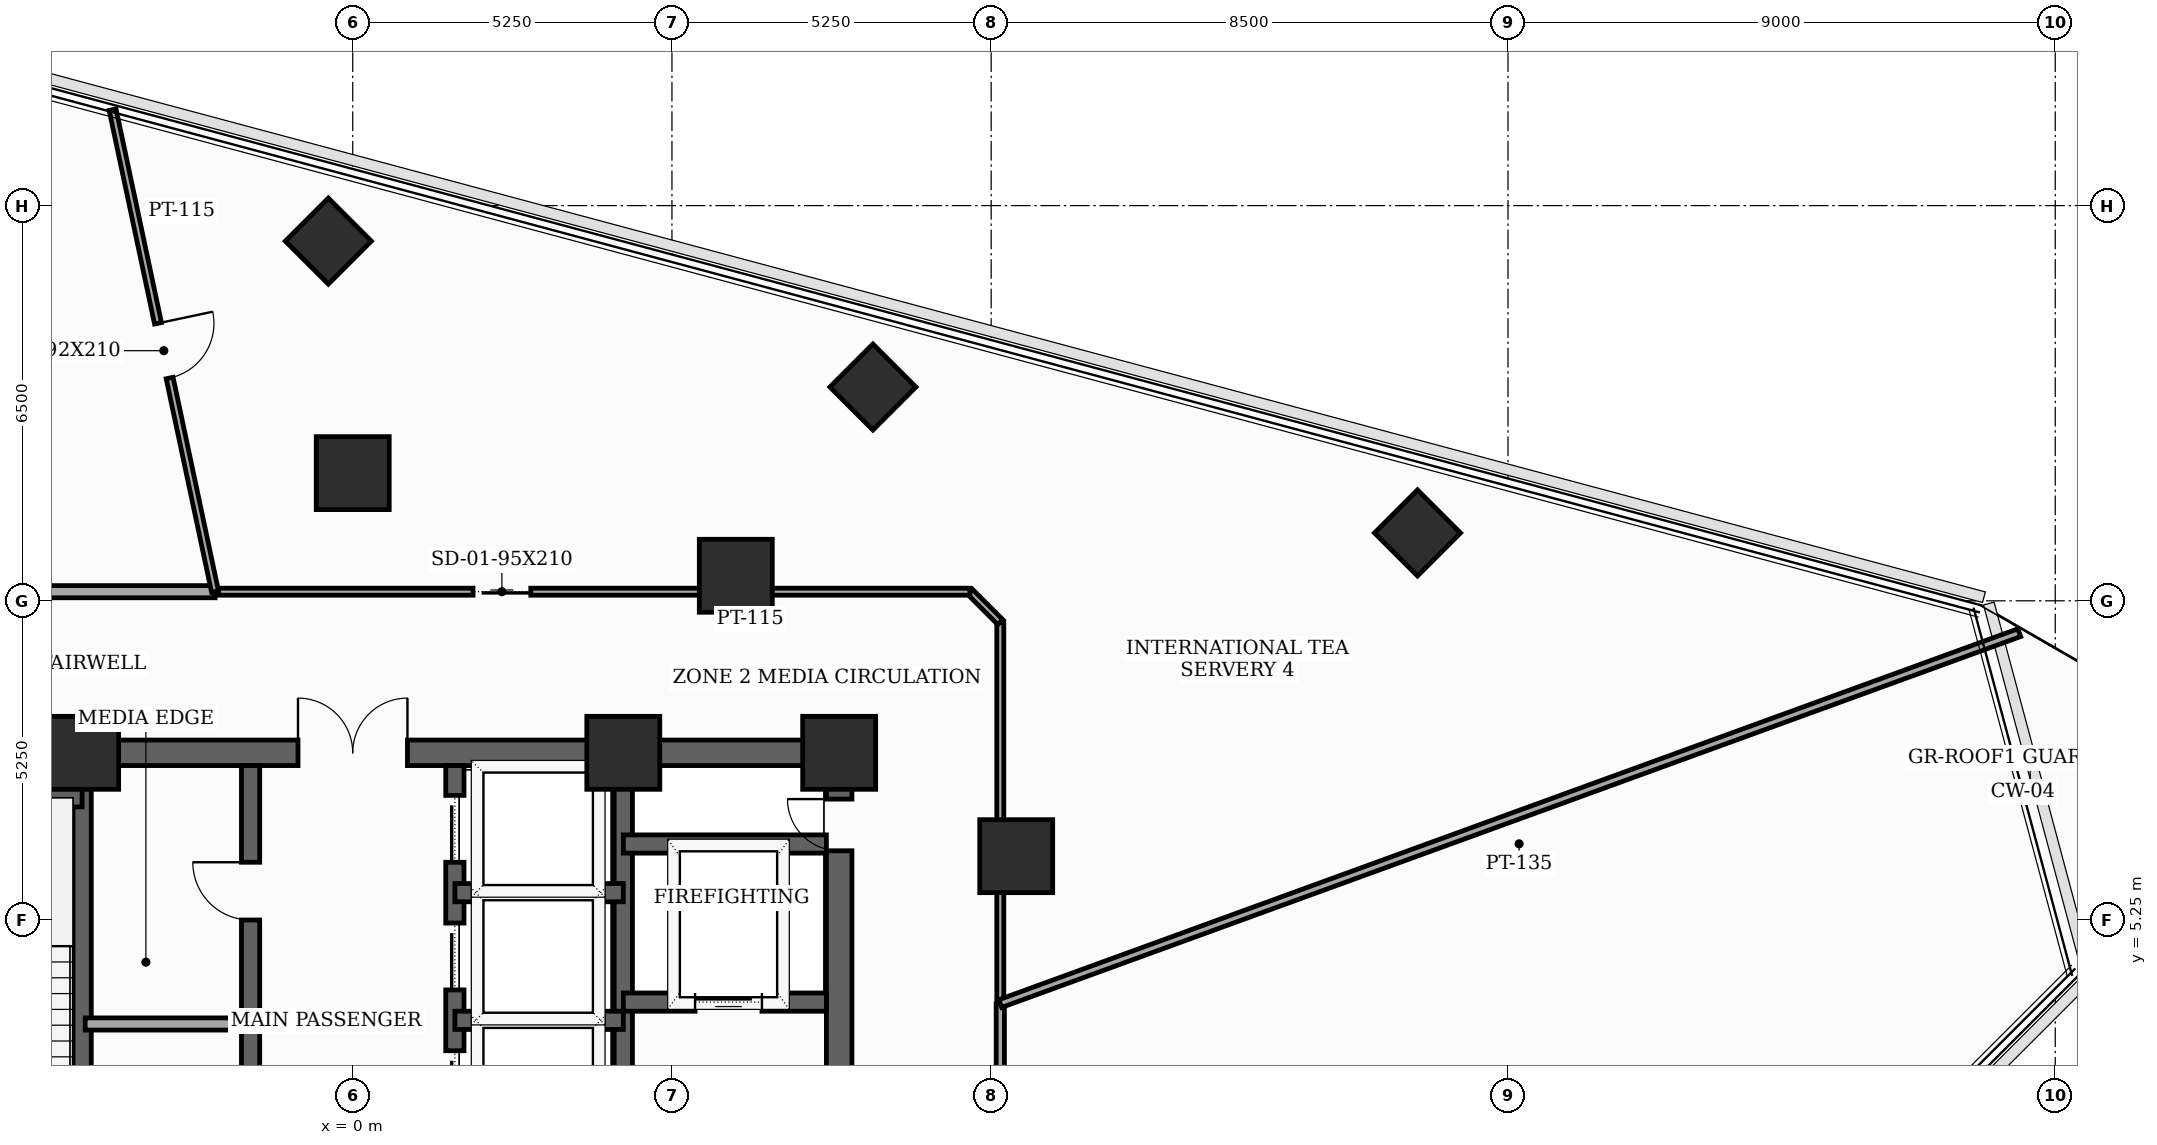
"""IFC4 building model, lengths in metres.
Left out: names, types, materials, properties, quantities, classifications, styles, units other than length and angle.
Written with IfcOpenShell. Run it as: python <this file> out.ifc"""

import sys

from ifc_helpers import new_model, si_unit, direction, frame, frame_2d, origin, origin_2d, place, context, subcontext, project, spatial, rectangle, extrude, element, fill, save


model = new_model("IFC4")
c1 = context("Model", 3, precision=1e-05, world=origin(), true_north=direction((0.0, 1.0)))
c2 = subcontext(c1, "Body", "Model", "MODEL_VIEW")
j1 = project(units=[si_unit("LENGTHUNIT", "METRE"), si_unit("PLANEANGLEUNIT", "RADIAN")], contexts=[c1])
p1 = place(None, origin())
s1 = spatial("IfcSite", under=j1, at=p1, CompositionType="ELEMENT")
p2 = place(p1, origin())
s2 = spatial("IfcBuilding", under=s1, at=p2, CompositionType="ELEMENT")
p3 = place(p2, frame((0.0, 0.0, 195.3)))
s3 = spatial("IfcBuildingStorey", under=s2, at=p3, CompositionType="ELEMENT", Elevation=195.3)
for number, where, z_axis, x_axis in (
    (1, (8.0, 8.0, 0.0), (0.0, 0.0, 1.0), (1.0, 0.0, 0.0)),
    (2, (4.45, 8.0, 0.0), (0.0, 0.0, 1.0), (1.0, 0.0, 0.0)),
    (3, (-4.45, 8.0, 0.0), (0.0, 0.0, 1.0), (1.0, 0.0, 0.0)),
    (4, (10.912, 6.3, 0.0), (0.0, 0.0, 1.0), (1.0, 0.0, 0.0)),
    (5, (6.3, 10.912, 0.0), (0.0, 0.0, 1.0), (1.0, 0.0, 0.0)),
    (6, (0.0, 12.6, 0.0), (0.0, 0.0, 1.0), (1.0, 0.0, 0.0)),
):
    element("IfcColumn", number, at=place(p3, frame(where, z_axis=z_axis, x_axis=x_axis)), inside=s3, PredefinedType="COLUMN", context=c2, shape_type="SweptSolid", body=[
        extrude(rectangle(XDim=1.2, YDim=1.2, at=origin_2d()), origin(), (0.0, 0.0, 1.0), 3.7),
    ])
for number, where, z_axis, x_axis in (
    (7, (17.511, 11.616, 0.0), (0.0, 0.0, 1.0), (0.707, 0.707, 0.0)),
    (8, (8.555, 14.016, 0.0), (0.0, 0.0, 1.0), (0.707, 0.707, 0.0)),
    (9, (-0.401, 16.416, 0.0), (0.0, 0.0, 1.0), (0.707, 0.707, 0.0)),
):
    element("IfcColumn", number, at=place(p3, frame(where, z_axis=z_axis, x_axis=x_axis)), inside=s3, PredefinedType="COLUMN", context=c2, shape_type="SweptSolid", body=[
        extrude(rectangle(XDim=1.0, YDim=1.0, at=origin_2d()), origin(), (0.0, 0.0, 1.0), 3.7),
    ])
p4 = place(p3, frame((8.0, -8.0, 0.0), z_axis=(0.0, 0.0, 1.0), x_axis=(0.0, 1.0, 0.0)))
e10 = element("IfcWall", 10, at=p4, inside=s3, PredefinedType="SHEAR", context=c2, shape_type="SweptSolid", body=[
    extrude(rectangle(XDim=16.0, YDim=0.42, at=frame_2d((8.0, 0.0))), origin(), (0.0, 0.0, 1.0), 3.5),
])
p5 = place(p4, frame((9.6, 0.0, 0.0)))
e11 = element("IfcOpeningElement", 11, at=p5, cuts=e10, PredefinedType="OPENING", context=c2, shape_type="SweptSolid", body=[
    extrude(rectangle(XDim=1.05, YDim=2.15, at=frame_2d((0.525, 1.075))), frame((0.0, 0.22, 0.0), z_axis=(0.0, -1.0, 0.0), x_axis=(1.0, 0.0, 0.0)), (0.0, 0.0, 1.0), 0.44),
])
p6 = place(p4, frame((14.389, 0.0, 0.0)))
e12 = element("IfcOpeningElement", 12, at=p6, cuts=e10, PredefinedType="OPENING", context=c2, shape_type="SweptSolid", body=[
    extrude(rectangle(XDim=0.85, YDim=2.02, at=frame_2d((0.425, 1.01))), frame((0.0, 0.22, 0.0), z_axis=(0.0, -1.0, 0.0), x_axis=(1.0, 0.0, 0.0)), (0.0, 0.0, 1.0), 0.44),
])
p7 = place(p3, frame((-8.0, 8.0, 0.0), z_axis=(0.0, 0.0, 1.0), x_axis=(1.0, 0.0, 0.0)))
e13 = element("IfcWall", 13, at=p7, inside=s3, PredefinedType="SHEAR", context=c2, shape_type="SweptSolid", body=[
    extrude(rectangle(XDim=16.0, YDim=0.42, at=frame_2d((8.0, 0.0))), origin(), (0.0, 0.0, 1.0), 3.5),
])
p8 = place(p7, frame((7.1, 0.0, 0.0)))
e14 = element("IfcOpeningElement", 14, at=p8, cuts=e13, PredefinedType="OPENING", context=c2, shape_type="SweptSolid", body=[
    extrude(rectangle(XDim=1.8, YDim=2.15, at=frame_2d((0.9, 1.075))), frame((0.0, 0.22, 0.0), z_axis=(0.0, -1.0, 0.0), x_axis=(1.0, 0.0, 0.0)), (0.0, 0.0, 1.0), 0.44),
])
for number, where, z_axis, x_axis in (
    (15, (-4.45, -7.79, 0.0), (0.0, 0.0, 1.0), (0.0, 1.0, 0.0)),
    (16, (4.45, -7.79, 0.0), (0.0, 0.0, 1.0), (0.0, 1.0, 0.0)),
):
    element("IfcWall", number, at=place(p3, frame(where, z_axis=z_axis, x_axis=x_axis)), inside=s3, PredefinedType="SHEAR", context=c2, shape_type="SweptSolid", body=[
        extrude(rectangle(XDim=15.58, YDim=0.3, at=frame_2d((7.79, 0.0))), origin(), (0.0, 0.0, 1.0), 3.5),
    ])
p9 = place(p3, frame((-7.79, 7.26, 0.0), z_axis=(0.0, 0.0, 1.0), x_axis=(1.0, 0.0, 0.0)))
e17 = element("IfcWall", 17, at=p9, inside=s3, PredefinedType="SHEAR", context=c2, shape_type="SweptSolid", body=[
    extrude(rectangle(XDim=3.34, YDim=0.3, at=frame_2d((1.67, 0.0))), origin(), (0.0, 0.0, 1.0), 3.5),
])
p10 = place(p3, frame((4.45, 3.9, 0.0), z_axis=(0.0, 0.0, 1.0), x_axis=(1.0, 0.0, 0.0)))
e18 = element("IfcWall", 18, at=p10, inside=s3, PredefinedType="SHEAR", context=c2, shape_type="SweptSolid", body=[
    extrude(rectangle(XDim=3.34, YDim=0.3, at=frame_2d((1.67, 0.0))), origin(), (0.0, 0.0, 1.0), 3.5),
])
p11 = place(p10, frame((1.18, 0.0, 0.0)))
e19 = element("IfcOpeningElement", 19, at=p11, cuts=e18, PredefinedType="OPENING", context=c2, shape_type="SweptSolid", body=[
    extrude(rectangle(XDim=1.1, YDim=2.1, at=frame_2d((0.55, 1.05))), frame((0.0, 0.16, 0.0), z_axis=(0.0, -1.0, 0.0), x_axis=(1.0, 0.0, 0.0)), (0.0, 0.0, 1.0), 0.32),
])
p12 = place(p3, frame((4.45, 6.5, 0.0), z_axis=(0.0, 0.0, 1.0), x_axis=(1.0, 0.0, 0.0)))
e20 = element("IfcWall", 20, at=p12, inside=s3, PredefinedType="SHEAR", context=c2, shape_type="SweptSolid", body=[
    extrude(rectangle(XDim=3.34, YDim=0.3, at=frame_2d((1.67, 0.0))), origin(), (0.0, 0.0, 1.0), 3.5),
])
p13 = place(p3, frame((-1.68, -4.85, 0.0), z_axis=(0.0, 0.0, 1.0), x_axis=(0.0, 1.0, 0.0)))
e21 = element("IfcWall", 21, at=p13, inside=s3, PredefinedType="SHEAR", context=c2, shape_type="SweptSolid", body=[
    extrude(rectangle(XDim=12.64, YDim=0.3, at=frame_2d((6.32, 0.0))), origin(), (0.0, 0.0, 1.0), 3.5),
])
p14 = place(p13, frame((1.65, 0.0, 0.0)))
e22 = element("IfcOpeningElement", 22, at=p14, cuts=e21, PredefinedType="OPENING", context=c2, shape_type="SweptSolid", body=[
    extrude(rectangle(XDim=0.95, YDim=2.1, at=frame_2d((0.475, 1.05))), frame((0.0, 0.16, 0.0), z_axis=(0.0, -1.0, 0.0), x_axis=(1.0, 0.0, 0.0)), (0.0, 0.0, 1.0), 0.32),
])
p15 = place(p13, frame((5.9, 0.0, 0.0)))
e23 = element("IfcOpeningElement", 23, at=p15, cuts=e21, PredefinedType="OPENING", context=c2, shape_type="SweptSolid", body=[
    extrude(rectangle(XDim=0.95, YDim=2.1, at=frame_2d((0.475, 1.05))), frame((0.0, 0.16, 0.0), z_axis=(0.0, -1.0, 0.0), x_axis=(1.0, 0.0, 0.0)), (0.0, 0.0, 1.0), 0.32),
])
p16 = place(p13, frame((10.1, 0.0, 0.0)))
e24 = element("IfcOpeningElement", 24, at=p16, cuts=e21, PredefinedType="OPENING", context=c2, shape_type="SweptSolid", body=[
    extrude(rectangle(XDim=0.95, YDim=2.1, at=frame_2d((0.475, 1.05))), frame((0.0, 0.16, 0.0), z_axis=(0.0, -1.0, 0.0), x_axis=(1.0, 0.0, 0.0)), (0.0, 0.0, 1.0), 0.32),
])
p17 = place(p3, frame((1.68, -4.85, 0.0), z_axis=(0.0, 0.0, 1.0), x_axis=(0.0, 1.0, 0.0)))
e25 = element("IfcWall", 25, at=p17, inside=s3, PredefinedType="SHEAR", context=c2, shape_type="SweptSolid", body=[
    extrude(rectangle(XDim=12.64, YDim=0.3, at=frame_2d((6.32, 0.0))), origin(), (0.0, 0.0, 1.0), 3.5),
])
p18 = place(p17, frame((0.55, 0.0, 0.0)))
e26 = element("IfcOpeningElement", 26, at=p18, cuts=e25, PredefinedType="OPENING", context=c2, shape_type="SweptSolid", body=[
    extrude(rectangle(XDim=1.1, YDim=2.1, at=frame_2d((0.55, 1.05))), frame((0.0, 0.16, 0.0), z_axis=(0.0, -1.0, 0.0), x_axis=(1.0, 0.0, 0.0)), (0.0, 0.0, 1.0), 0.32),
])
p19 = place(p17, frame((2.65, 0.0, 0.0)))
e27 = element("IfcOpeningElement", 27, at=p19, cuts=e25, PredefinedType="OPENING", context=c2, shape_type="SweptSolid", body=[
    extrude(rectangle(XDim=1.1, YDim=2.1, at=frame_2d((0.55, 1.05))), frame((0.0, 0.16, 0.0), z_axis=(0.0, -1.0, 0.0), x_axis=(1.0, 0.0, 0.0)), (0.0, 0.0, 1.0), 0.32),
])
p20 = place(p17, frame((4.75, 0.0, 0.0)))
e28 = element("IfcOpeningElement", 28, at=p20, cuts=e25, PredefinedType="OPENING", context=c2, shape_type="SweptSolid", body=[
    extrude(rectangle(XDim=1.1, YDim=2.1, at=frame_2d((0.55, 1.05))), frame((0.0, 0.16, 0.0), z_axis=(0.0, -1.0, 0.0), x_axis=(1.0, 0.0, 0.0)), (0.0, 0.0, 1.0), 0.32),
])
p21 = place(p17, frame((6.85, 0.0, 0.0)))
e29 = element("IfcOpeningElement", 29, at=p21, cuts=e25, PredefinedType="OPENING", context=c2, shape_type="SweptSolid", body=[
    extrude(rectangle(XDim=1.1, YDim=2.1, at=frame_2d((0.55, 1.05))), frame((0.0, 0.16, 0.0), z_axis=(0.0, -1.0, 0.0), x_axis=(1.0, 0.0, 0.0)), (0.0, 0.0, 1.0), 0.32),
])
p22 = place(p17, frame((8.95, 0.0, 0.0)))
e30 = element("IfcOpeningElement", 30, at=p22, cuts=e25, PredefinedType="OPENING", context=c2, shape_type="SweptSolid", body=[
    extrude(rectangle(XDim=1.1, YDim=2.1, at=frame_2d((0.55, 1.05))), frame((0.0, 0.16, 0.0), z_axis=(0.0, -1.0, 0.0), x_axis=(1.0, 0.0, 0.0)), (0.0, 0.0, 1.0), 0.32),
])
p23 = place(p17, frame((11.05, 0.0, 0.0)))
e31 = element("IfcOpeningElement", 31, at=p23, cuts=e25, PredefinedType="OPENING", context=c2, shape_type="SweptSolid", body=[
    extrude(rectangle(XDim=1.1, YDim=2.1, at=frame_2d((0.55, 1.05))), frame((0.0, 0.16, 0.0), z_axis=(0.0, -1.0, 0.0), x_axis=(1.0, 0.0, 0.0)), (0.0, 0.0, 1.0), 0.32),
])
for number, where, z_axis, x_axis in (
    (32, (1.68, 3.6, 0.0), (0.0, 0.0, 1.0), (1.0, 0.0, 0.0)),
    (33, (1.68, 5.7, 0.0), (0.0, 0.0, 1.0), (1.0, 0.0, 0.0)),
):
    element("IfcWall", number, at=place(p3, frame(where, z_axis=z_axis, x_axis=x_axis)), inside=s3, PredefinedType="SHEAR", context=c2, shape_type="SweptSolid", body=[
        extrude(rectangle(XDim=2.77, YDim=0.3, at=frame_2d((1.385, 0.0))), origin(), (0.0, 0.0, 1.0), 3.5),
    ])
p24 = place(p3, frame((-4.4, 3.54, 0.0), z_axis=(0.0, 0.0, 1.0), x_axis=(1.0, 0.0, 0.0)))
e34 = element("IfcWall", 34, at=p24, inside=s3, PredefinedType="SOLIDWALL", context=c2, shape_type="SweptSolid", body=[
    extrude(rectangle(XDim=2.68, YDim=0.2, at=frame_2d((1.34, 0.0))), origin(), (0.0, 0.0, 1.0), 3.5),
])
p25 = place(p3, frame((10.65, -7.738, 0.0), z_axis=(0.0, 0.0, 1.0), x_axis=(0.0, 1.0, 0.0)))
e35 = element("IfcWall", 35, at=p25, inside=s3, PredefinedType="PARTITIONING", context=c2, shape_type="SweptSolid", body=[
    extrude(rectangle(XDim=11.614, YDim=0.135, at=frame_2d((5.807, 0.0))), origin(), (0.0, 0.0, 1.0), 2.885),
])
p26 = place(p25, frame((5.332, 0.0, 0.0)))
e36 = element("IfcOpeningElement", 36, at=p26, cuts=e35, PredefinedType="OPENING", context=c2, shape_type="SweptSolid", body=[
    extrude(rectangle(XDim=0.95, YDim=2.1, at=frame_2d((0.475, 1.05))), frame((0.0, 0.077, 0.0), z_axis=(0.0, -1.0, 0.0), x_axis=(1.0, 0.0, 0.0)), (0.0, 0.0, 1.0), 0.155),
])
p27 = place(p3, frame((10.65, 3.876, 0.0), z_axis=(0.0, 0.0, 1.0), x_axis=(0.0, 1.0, 0.0)))
e37 = element("IfcWall", 37, at=p27, inside=s3, PredefinedType="PARTITIONING", context=c2, shape_type="SweptSolid", body=[
    extrude(rectangle(XDim=6.274, YDim=0.115, at=frame_2d((3.137, 0.0))), origin(), (0.0, 0.0, 1.0), 2.885),
])
p28 = place(p3, frame((10.65, 10.15, 0.0), z_axis=(0.0, 0.0, 1.0), x_axis=(-0.707106781187, 0.707106781187, 0.0)))
e38 = element("IfcWall", 38, at=p28, inside=s3, PredefinedType="PARTITIONING", context=c2, shape_type="SweptSolid", body=[
    extrude(rectangle(XDim=0.707, YDim=0.115, at=frame_2d((0.354, 0.0))), origin(), (0.0, 0.0, 1.0), 3.5),
])
p29 = place(p3, frame((10.15, 10.65, 0.0), z_axis=(0.0, 0.0, 1.0), x_axis=(-1.0, 0.0, 0.0)))
e39 = element("IfcWall", 39, at=p29, inside=s3, PredefinedType="PARTITIONING", context=c2, shape_type="SweptSolid", body=[
    extrude(rectangle(XDim=12.414, YDim=0.115, at=frame_2d((6.207, 0.0))), origin(), (0.0, 0.0, 1.0), 2.885),
])
p30 = place(p29, frame((7.222, 0.0, 0.0)))
e40 = element("IfcOpeningElement", 40, at=p30, cuts=e39, PredefinedType="OPENING", context=c2, shape_type="SweptSolid", body=[
    extrude(rectangle(XDim=0.95, YDim=2.1, at=frame_2d((0.475, 1.05))), frame((0.0, 0.067, 0.0), z_axis=(0.0, -1.0, 0.0), x_axis=(1.0, 0.0, 0.0)), (0.0, 0.0, 1.0), 0.135),
])
p31 = place(p3, frame((-2.264, 10.65, 0.0), z_axis=(0.0, 0.0, 1.0), x_axis=(-1.0, 0.0, 0.0)))
e41 = element("IfcWall", 41, at=p31, inside=s3, PredefinedType="SOLIDWALL", context=c2, shape_type="SweptSolid", body=[
    extrude(rectangle(XDim=7.886, YDim=0.2, at=frame_2d((3.943, 0.0))), origin(), (0.0, 0.0, 1.0), 2.885),
])
p32 = place(p3, frame((27.408, 9.976, 0.0), z_axis=(0.0, 0.0, 1.0), x_axis=(-0.939687855064, -0.342033236756, 0.0)))
e42 = element("IfcWall", 42, at=p32, inside=s3, PredefinedType="PARTITIONING", context=c2, shape_type="SweptSolid", body=[
    extrude(rectangle(XDim=17.833, YDim=0.135, at=frame_2d((8.917, 0.0))), origin(), (0.0, 0.0, 1.0), 2.885),
])
p33 = place(p3, frame((-3.949, 18.578, 0.0), z_axis=(0.0, 0.0, 1.0), x_axis=(0.20795313807, -0.978138789931, 0.0)))
e43 = element("IfcWall", 43, at=p33, inside=s3, PredefinedType="PARTITIONING", context=c2, shape_type="SweptSolid", body=[
    extrude(rectangle(XDim=8.105, YDim=0.115, at=frame_2d((4.053, 0.0))), origin(), (0.0, 0.0, 1.0), 2.885),
])
p34 = place(p33, frame((3.593, 0.0, 0.0)))
e44 = element("IfcOpeningElement", 44, at=p34, cuts=e43, PredefinedType="OPENING", context=c2, shape_type="SweptSolid", body=[
    extrude(rectangle(XDim=0.92, YDim=2.1, at=frame_2d((0.46, 1.05))), frame((0.0, 0.067, 0.0), z_axis=(0.0, -1.0, 0.0), x_axis=(1.0, 0.0, 0.0)), (0.0, 0.0, 1.0), 0.135),
])
p35 = place(p6, origin())
e45 = element("IfcDoor", 45, at=p35, inside=s3, OperationType="SINGLE_SWING_RIGHT", PredefinedType="TRAPDOOR", context=c2, shape_type="SweptSolid", body=[
    extrude(rectangle(XDim=0.85, YDim=2.02, at=frame_2d((0.425, 1.01))), frame((0.0, 0.025, 0.0), z_axis=(0.0, -1.0, 0.0), x_axis=(1.0, 0.0, 0.0)), (0.0, 0.0, 1.0), 0.05),
])
fill(e12, e45)
p36 = place(p8, origin())
e46 = element("IfcDoor", 46, at=p36, inside=s3, OperationType="DOUBLE_DOOR_SINGLE_SWING", PredefinedType="DOOR", context=c2, shape_type="SweptSolid", body=[
    extrude(rectangle(XDim=1.8, YDim=2.15, at=frame_2d((0.9, 1.075))), frame((0.0, 0.025, 0.0), z_axis=(0.0, -1.0, 0.0), x_axis=(1.0, 0.0, 0.0)), (0.0, 0.0, 1.0), 0.05),
])
fill(e14, e46)
p37 = place(p11, origin())
e47 = element("IfcDoor", 47, at=p37, inside=s3, OperationType="SLIDING_TO_LEFT", PredefinedType="DOOR", context=c2, shape_type="SweptSolid", body=[
    extrude(rectangle(XDim=1.1, YDim=2.1, at=frame_2d((0.55, 1.05))), frame((0.0, 0.025, 0.0), z_axis=(0.0, -1.0, 0.0), x_axis=(1.0, 0.0, 0.0)), (0.0, 0.0, 1.0), 0.05),
])
fill(e19, e47)
p38 = place(p16, origin())
e48 = element("IfcDoor", 48, at=p38, inside=s3, OperationType="SINGLE_SWING_RIGHT", PredefinedType="DOOR", context=c2, shape_type="SweptSolid", body=[
    extrude(rectangle(XDim=0.95, YDim=2.1, at=frame_2d((0.475, 1.05))), frame((0.0, 0.025, 0.0), z_axis=(0.0, -1.0, 0.0), x_axis=(1.0, 0.0, 0.0)), (0.0, 0.0, 1.0), 0.05),
])
fill(e24, e48)
p39 = place(p21, origin())
e49 = element("IfcDoor", 49, at=p39, inside=s3, OperationType="SLIDING_TO_LEFT", PredefinedType="DOOR", context=c2, shape_type="SweptSolid", body=[
    extrude(rectangle(XDim=1.1, YDim=2.1, at=frame_2d((0.55, 1.05))), frame((0.0, 0.025, 0.0), z_axis=(0.0, -1.0, 0.0), x_axis=(1.0, 0.0, 0.0)), (0.0, 0.0, 1.0), 0.05),
])
fill(e29, e49)
p40 = place(p22, origin())
e50 = element("IfcDoor", 50, at=p40, inside=s3, OperationType="SLIDING_TO_LEFT", PredefinedType="DOOR", context=c2, shape_type="SweptSolid", body=[
    extrude(rectangle(XDim=1.1, YDim=2.1, at=frame_2d((0.55, 1.05))), frame((0.0, 0.025, 0.0), z_axis=(0.0, -1.0, 0.0), x_axis=(1.0, 0.0, 0.0)), (0.0, 0.0, 1.0), 0.05),
])
fill(e30, e50)
p41 = place(p23, origin())
e51 = element("IfcDoor", 51, at=p41, inside=s3, OperationType="SLIDING_TO_LEFT", PredefinedType="DOOR", context=c2, shape_type="SweptSolid", body=[
    extrude(rectangle(XDim=1.1, YDim=2.1, at=frame_2d((0.55, 1.05))), frame((0.0, 0.025, 0.0), z_axis=(0.0, -1.0, 0.0), x_axis=(1.0, 0.0, 0.0)), (0.0, 0.0, 1.0), 0.05),
])
fill(e31, e51)
p42 = place(p30, origin())
e52 = element("IfcDoor", 52, at=p42, inside=s3, OperationType="SLIDING_TO_LEFT", PredefinedType="DOOR", context=c2, shape_type="SweptSolid", body=[
    extrude(rectangle(XDim=0.95, YDim=2.1, at=frame_2d((0.475, 1.05))), frame((0.0, 0.025, 0.0), z_axis=(0.0, -1.0, 0.0), x_axis=(1.0, 0.0, 0.0)), (0.0, 0.0, 1.0), 0.05),
])
fill(e40, e52)
p43 = place(p34, origin())
e53 = element("IfcDoor", 53, at=p43, inside=s3, OperationType="SINGLE_SWING_LEFT", PredefinedType="DOOR", context=c2, shape_type="SweptSolid", body=[
    extrude(rectangle(XDim=0.92, YDim=2.1, at=frame_2d((0.46, 1.05))), frame((0.0, 0.025, 0.0), z_axis=(0.0, -1.0, 0.0), x_axis=(1.0, 0.0, 0.0)), (0.0, 0.0, 1.0), 0.05),
])
fill(e44, e53)
save(model, sys.argv[1])
